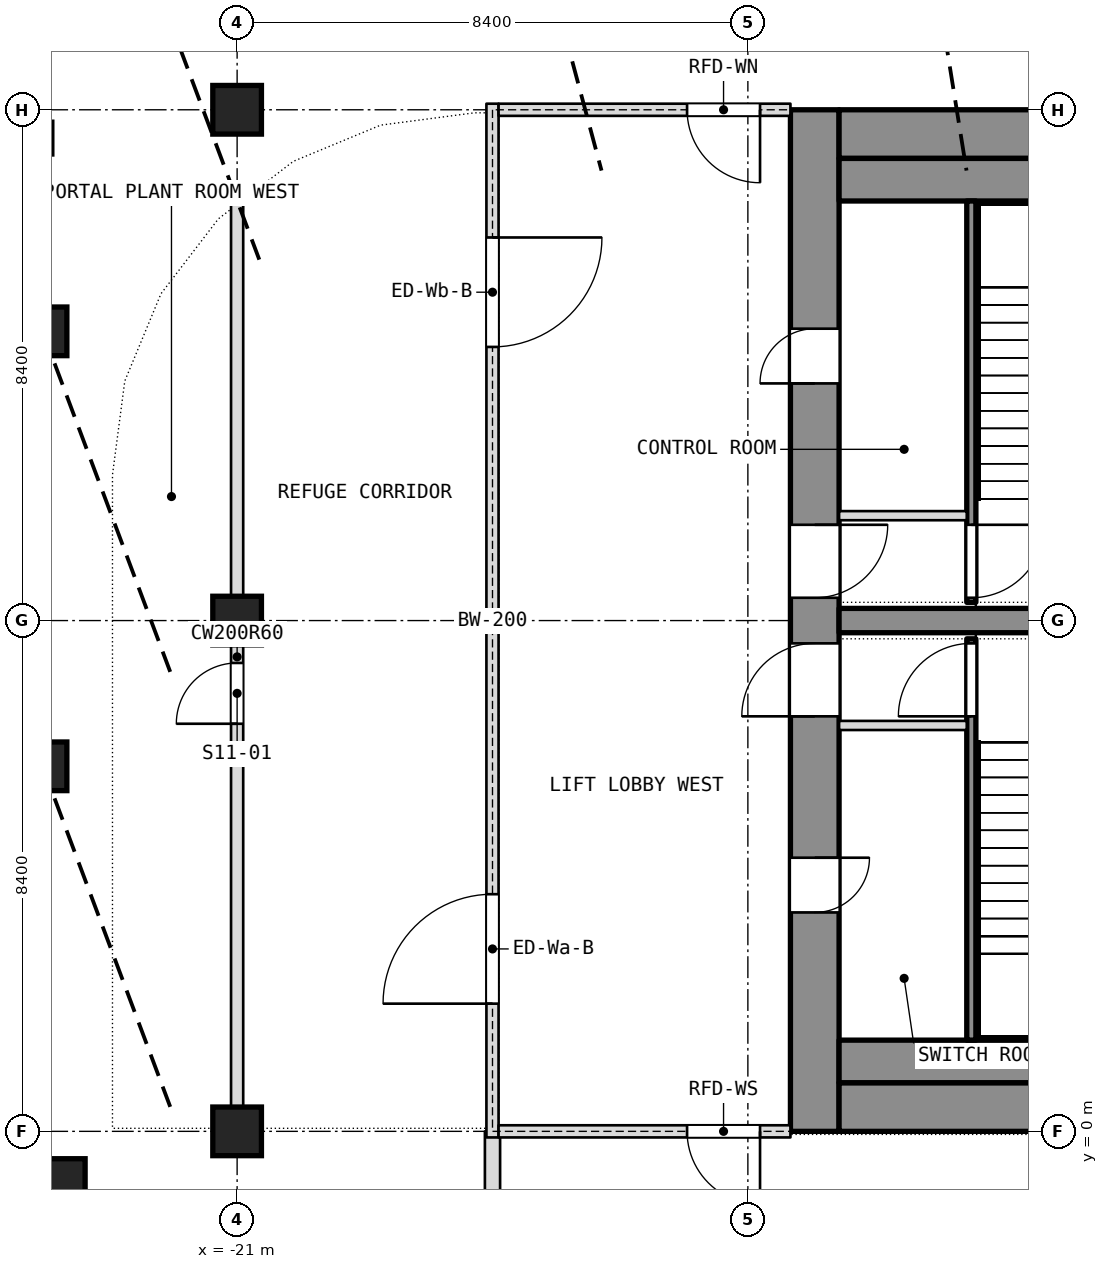
"""IFC4 building model, lengths in metres.
Left out: names, types, materials, properties, quantities, classifications, styles, units other than length and angle.
Written with IfcOpenShell. Run it as: python <this file> out.ifc"""

import sys

from ifc_helpers import new_model, si_unit, direction, frame, frame_2d, origin, origin_2d, place, context, subcontext, project, spatial, rectangle, i_section, extrude, element, fill, save


model = new_model("IFC4")
c1 = context("Model", 3, precision=1e-05, world=origin(), true_north=direction((0.0, 1.0)))
c2 = subcontext(c1, "Body", "Model", "MODEL_VIEW")
j1 = project(units=[si_unit("LENGTHUNIT", "METRE"), si_unit("PLANEANGLEUNIT", "RADIAN")], contexts=[c1])
p1 = place(None, origin())
s1 = spatial("IfcSite", under=j1, at=p1, CompositionType="ELEMENT")
p2 = place(p1, origin())
s2 = spatial("IfcBuilding", under=s1, at=p2, CompositionType="ELEMENT")
p3 = place(p2, frame((0.0, 0.0, 252.5)))
s3 = spatial("IfcBuildingStorey", under=s2, at=p3, CompositionType="ELEMENT", Elevation=252.5)
p4 = place(p3, frame((-11.5, 0.0, 0.0), z_axis=(0.0, 0.0, 1.0), x_axis=(0.0, 1.0, 0.0)))
e1 = element("IfcWall", 1, at=p4, inside=s3, PredefinedType="SHEAR", context=c2, shape_type="SweptSolid", body=[
    extrude(rectangle(XDim=16.8, YDim=0.8, at=frame_2d((8.4, 0.0))), origin(), (0.0, 0.0, 1.0), 14.4),
])
p5 = place(p4, frame((3.6, 0.0, 0.0)))
e2 = element("IfcOpeningElement", 2, at=p5, cuts=e1, PredefinedType="OPENING", context=c2, shape_type="SweptSolid", body=[
    extrude(rectangle(XDim=0.9, YDim=2.1, at=frame_2d((0.45, 1.05))), frame((0.0, 0.4, 0.0), z_axis=(0.0, -1.0, 0.0), x_axis=(1.0, 0.0, 0.0)), (0.0, 0.0, 1.0), 0.8),
])
p6 = place(p4, frame((6.825, 0.0, 0.0)))
e3 = element("IfcOpeningElement", 3, at=p6, cuts=e1, PredefinedType="OPENING", context=c2, shape_type="SweptSolid", body=[
    extrude(rectangle(XDim=1.2, YDim=2.1, at=frame_2d((0.6, 1.05))), frame((0.0, 0.4, 0.0), z_axis=(0.0, -1.0, 0.0), x_axis=(1.0, 0.0, 0.0)), (0.0, 0.0, 1.0), 0.8),
])
p7 = place(p4, frame((12.3, 0.0, 0.0)))
e4 = element("IfcOpeningElement", 4, at=p7, cuts=e1, PredefinedType="OPENING", context=c2, shape_type="SweptSolid", body=[
    extrude(rectangle(XDim=0.9, YDim=2.1, at=frame_2d((0.45, 1.05))), frame((0.0, 0.4, 0.0), z_axis=(0.0, -1.0, 0.0), x_axis=(1.0, 0.0, 0.0)), (0.0, 0.0, 1.0), 0.8),
])
p8 = place(p4, frame((8.775, 0.0, 0.0)))
e5 = element("IfcOpeningElement", 5, at=p8, cuts=e1, PredefinedType="OPENING", context=c2, shape_type="SweptSolid", body=[
    extrude(rectangle(XDim=1.2, YDim=2.1, at=frame_2d((0.6, 1.05))), frame((0.0, 0.4, 0.0), z_axis=(0.0, -1.0, 0.0), x_axis=(1.0, 0.0, 0.0)), (0.0, 0.0, 1.0), 0.8),
])
p9 = place(p3, frame((-11.1, 0.4, 0.0), z_axis=(0.0, 0.0, 1.0), x_axis=(1.0, 0.0, 0.0)))
e6 = element("IfcWall", 6, at=p9, inside=s3, PredefinedType="SHEAR", context=c2, shape_type="SweptSolid", body=[
    extrude(rectangle(XDim=22.2, YDim=0.8, at=frame_2d((11.1, 0.0))), origin(), (0.0, 0.0, 1.0), 14.4),
])
p10 = place(p9, frame((10.85, 0.0, 0.0)))
e7 = element("IfcOpeningElement", 7, at=p10, cuts=e6, PredefinedType="OPENING", context=c2, shape_type="SweptSolid", body=[
    extrude(rectangle(XDim=1.4, YDim=2.1, at=frame_2d((0.7, 1.05))), frame((0.0, 0.4, 0.0), z_axis=(0.0, -1.0, 0.0), x_axis=(1.0, 0.0, 0.0)), (0.0, 0.0, 1.0), 0.8),
])
p11 = place(p3, frame((-11.1, 16.4, 0.0), z_axis=(0.0, 0.0, 1.0), x_axis=(1.0, 0.0, 0.0)))
e8 = element("IfcWall", 8, at=p11, inside=s3, PredefinedType="SHEAR", context=c2, shape_type="SweptSolid", body=[
    extrude(rectangle(XDim=22.2, YDim=0.8, at=frame_2d((11.1, 0.0))), origin(), (0.0, 0.0, 1.0), 14.4),
])
p12 = place(p11, frame((10.4, 0.0, 0.0)))
e9 = element("IfcOpeningElement", 9, at=p12, cuts=e8, PredefinedType="OPENING", context=c2, shape_type="SweptSolid", body=[
    extrude(rectangle(XDim=1.4, YDim=2.1, at=frame_2d((0.7, 1.05))), frame((0.0, 0.4, 0.0), z_axis=(0.0, -1.0, 0.0), x_axis=(1.0, 0.0, 0.0)), (0.0, 0.0, 1.0), 0.8),
])
p13 = place(p3, frame((-11.1, 8.4, 0.0), z_axis=(0.0, 0.0, 1.0), x_axis=(1.0, 0.0, 0.0)))
e10 = element("IfcWall", 10, at=p13, inside=s3, PredefinedType="SHEAR", context=c2, shape_type="SweptSolid", body=[
    extrude(rectangle(XDim=6.7, YDim=0.4, at=frame_2d((3.35, 0.0))), origin(), (0.0, 0.0, 1.0), 14.4),
])
for number, where, z_axis, x_axis in (
    (11, (-21.0, 0.0, 0.0), (0.0, 0.0, 1.0), (1.0, 0.0, 0.0)),
    (12, (-21.0, 8.4, 0.0), (0.0, 0.0, 1.0), (1.0, 0.0, 0.0)),
    (13, (-21.0, 16.8, 0.0), (0.0, 0.0, 1.0), (1.0, 0.0, 0.0)),
):
    element("IfcColumn", number, at=place(p3, frame(where, z_axis=z_axis, x_axis=x_axis)), inside=s3, PredefinedType="COLUMN", context=c2, shape_type="SweptSolid", body=[
        extrude(rectangle(XDim=0.8, YDim=0.8, at=origin_2d()), origin(), (0.0, 0.0, 1.0), 14.14),
    ])
for number, where, z_axis, x_axis in (
    (14, (-24.2, -1.15, 0.0), (0.0, 0.0, 1.0), (1.0, 0.0, 0.0)),
    (15, (-24.2, 6.003, 0.0), (0.0, 0.0, 1.0), (1.0, 0.0, 0.0)),
    (16, (-24.2, 13.156, 0.0), (0.0, 0.0, 1.0), (1.0, 0.0, 0.0)),
):
    element("IfcColumn", number, at=place(p3, frame(where, z_axis=z_axis, x_axis=x_axis)), inside=s3, PredefinedType="COLUMN", context=c2, shape_type="SweptSolid", body=[
        extrude(i_section(OverallWidth=0.306, OverallDepth=0.524, WebThickness=0.024, FlangeThickness=0.04, FilletRadius=0.027, at=origin_2d()), origin(), (0.0, 0.0, 1.0), 13.74),
    ])
p14 = place(p3, frame((-24.2, 16.334, -0.3), z_axis=(0.0, 0.0, 1.0), x_axis=(1.0, 0.0, 0.0)))
e17 = element("IfcColumn", 17, at=p14, inside=s3, PredefinedType="COLUMN", context=c2, shape_type="SweptSolid", body=[
    extrude(i_section(OverallWidth=0.306, OverallDepth=0.524, WebThickness=0.024, FlangeThickness=0.04, FilletRadius=0.027, at=origin_2d()), origin(), (0.0, 0.0, 1.0), 14.04),
])
p15 = place(p3, frame((-21.0, 0.0, 0.0), z_axis=(0.0, 0.0, 1.0), x_axis=(0.0, 1.0, 0.0)))
e18 = element("IfcWall", 18, at=p15, inside=s3, PredefinedType="PARTITIONING", context=c2, shape_type="SweptSolid", body=[
    extrude(rectangle(XDim=15.606, YDim=0.2, at=frame_2d((7.803, 0.0))), origin(), (0.0, 0.0, 1.0), 13.74),
])
p16 = place(p15, frame((6.703, 0.0, 0.0)))
e19 = element("IfcOpeningElement", 19, at=p16, cuts=e18, PredefinedType="OPENING", context=c2, shape_type="SweptSolid", body=[
    extrude(rectangle(XDim=1.0, YDim=2.1, at=frame_2d((0.5, 1.05))), frame((0.0, 0.1, 0.0), z_axis=(0.0, -1.0, 0.0), x_axis=(1.0, 0.0, 0.0)), (0.0, 0.0, 1.0), 0.2),
])
p17 = place(p3, frame((-16.8, -14.0, 0.0), z_axis=(0.0, 0.0, 1.0), x_axis=(0.0, 1.0, 0.0)))
e20 = element("IfcWall", 20, at=p17, inside=s3, PredefinedType="SOLIDWALL", context=c2, shape_type="SweptSolid", body=[
    extrude(rectangle(XDim=14.0, YDim=0.25, at=frame_2d((7.0, 0.0))), origin(), (0.0, 0.0, 1.0), 14.14),
])
p18 = place(p17, frame((1.467, 0.0, 1.0)))
e21 = element("IfcOpeningElement", 21, at=p18, cuts=e20, PredefinedType="OPENING", context=c2, shape_type="SweptSolid", body=[
    extrude(rectangle(XDim=4.8, YDim=3.0, at=frame_2d((2.4, 1.5))), frame((0.0, 0.125, 0.0), z_axis=(0.0, -1.0, 0.0), x_axis=(1.0, 0.0, 0.0)), (0.0, 0.0, 1.0), 0.25),
])
p19 = place(p17, frame((7.733, 0.0, 1.0)))
e22 = element("IfcOpeningElement", 22, at=p19, cuts=e20, PredefinedType="OPENING", context=c2, shape_type="SweptSolid", body=[
    extrude(rectangle(XDim=4.8, YDim=3.0, at=frame_2d((2.4, 1.5))), frame((0.0, 0.125, 0.0), z_axis=(0.0, -1.0, 0.0), x_axis=(1.0, 0.0, 0.0)), (0.0, 0.0, 1.0), 0.25),
])
p20 = place(p3, frame((-11.1, 1.15, 0.0), z_axis=(0.0, 0.0, 1.0), x_axis=(1.0, 0.0, 0.0)))
e23 = element("IfcWall", 23, at=p20, inside=s3, PredefinedType="PARTITIONING", context=c2, shape_type="SweptSolid", body=[
    extrude(rectangle(XDim=10.85, YDim=0.7, at=frame_2d((5.425, 0.0))), origin(), (0.0, 0.0, 1.0), 14.14),
])
p21 = place(p3, frame((-11.1, 15.65, 0.0), z_axis=(0.0, 0.0, 1.0), x_axis=(1.0, 0.0, 0.0)))
e24 = element("IfcWall", 24, at=p21, inside=s3, PredefinedType="PARTITIONING", context=c2, shape_type="SweptSolid", body=[
    extrude(rectangle(XDim=10.2, YDim=0.7, at=frame_2d((5.1, 0.0))), origin(), (0.0, 0.0, 1.0), 14.14),
])
p22 = place(p3, frame((-8.925, 1.5, 0.0), z_axis=(0.0, 0.0, 1.0), x_axis=(0.0, 1.0, 0.0)))
e25 = element("IfcWall", 25, at=p22, inside=s3, PredefinedType="SHEAR", context=c2, shape_type="SweptSolid", body=[
    extrude(rectangle(XDim=6.6, YDim=0.15, at=frame_2d((3.3, 0.0))), origin(), (0.0, 0.0, 1.0), 14.14),
])
p23 = place(p22, frame((5.325, 0.0, 0.0)))
e26 = element("IfcOpeningElement", 26, at=p23, cuts=e25, PredefinedType="OPENING", context=c2, shape_type="SweptSolid", body=[
    extrude(rectangle(XDim=1.2, YDim=2.1, at=frame_2d((0.6, 1.05))), frame((0.0, 0.075, 0.0), z_axis=(0.0, -1.0, 0.0), x_axis=(1.0, 0.0, 0.0)), (0.0, 0.0, 1.0), 0.15),
])
p24 = place(p3, frame((-11.1, 6.675, 0.0), z_axis=(0.0, 0.0, 1.0), x_axis=(1.0, 0.0, 0.0)))
e27 = element("IfcWall", 27, at=p24, inside=s3, PredefinedType="PARTITIONING", context=c2, shape_type="SweptSolid", body=[
    extrude(rectangle(XDim=2.1, YDim=0.15, at=frame_2d((1.05, 0.0))), origin(), (0.0, 0.0, 1.0), 14.14),
])
p25 = place(p3, frame((-8.925, 8.7, 0.0), z_axis=(0.0, 0.0, 1.0), x_axis=(0.0, 1.0, 0.0)))
e28 = element("IfcWall", 28, at=p25, inside=s3, PredefinedType="SHEAR", context=c2, shape_type="SweptSolid", body=[
    extrude(rectangle(XDim=6.6, YDim=0.15, at=frame_2d((3.3, 0.0))), origin(), (0.0, 0.0, 1.0), 14.14),
])
p26 = place(p25, frame((0.075, 0.0, 0.0)))
e29 = element("IfcOpeningElement", 29, at=p26, cuts=e28, PredefinedType="OPENING", context=c2, shape_type="SweptSolid", body=[
    extrude(rectangle(XDim=1.2, YDim=2.1, at=frame_2d((0.6, 1.05))), frame((0.0, 0.075, 0.0), z_axis=(0.0, -1.0, 0.0), x_axis=(1.0, 0.0, 0.0)), (0.0, 0.0, 1.0), 0.15),
])
p27 = place(p3, frame((-11.1, 10.125, 0.0), z_axis=(0.0, 0.0, 1.0), x_axis=(1.0, 0.0, 0.0)))
e30 = element("IfcWall", 30, at=p27, inside=s3, PredefinedType="PARTITIONING", context=c2, shape_type="SweptSolid", body=[
    extrude(rectangle(XDim=2.1, YDim=0.15, at=frame_2d((1.05, 0.0))), origin(), (0.0, 0.0, 1.0), 14.14),
])
p28 = place(p3, frame((-16.8, -0.1, 0.0), z_axis=(0.0, 0.0, 1.0), x_axis=(0.0, 1.0, 0.0)))
e31 = element("IfcWall", 31, at=p28, inside=s3, PredefinedType="PARTITIONING", context=c2, shape_type="SweptSolid", body=[
    extrude(rectangle(XDim=17.0, YDim=0.2, at=frame_2d((8.5, 0.0))), origin(), (0.0, 0.0, 1.0), 13.74),
])
p29 = place(p28, frame((2.2, 0.0, 0.0)))
e32 = element("IfcOpeningElement", 32, at=p29, cuts=e31, PredefinedType="OPENING", context=c2, shape_type="SweptSolid", body=[
    extrude(rectangle(XDim=1.8, YDim=2.1, at=frame_2d((0.9, 1.05))), frame((0.0, 0.1, 0.0), z_axis=(0.0, -1.0, 0.0), x_axis=(1.0, 0.0, 0.0)), (0.0, 0.0, 1.0), 0.2),
])
p30 = place(p28, frame((13.0, 0.0, 0.0)))
e33 = element("IfcOpeningElement", 33, at=p30, cuts=e31, PredefinedType="OPENING", context=c2, shape_type="SweptSolid", body=[
    extrude(rectangle(XDim=1.8, YDim=2.1, at=frame_2d((0.9, 1.05))), frame((0.0, 0.1, 0.0), z_axis=(0.0, -1.0, 0.0), x_axis=(1.0, 0.0, 0.0)), (0.0, 0.0, 1.0), 0.2),
])
p31 = place(p3, frame((-16.7, 0.0, 0.0), z_axis=(0.0, 0.0, 1.0), x_axis=(1.0, 0.0, 0.0)))
e34 = element("IfcWall", 34, at=p31, inside=s3, PredefinedType="PARTITIONING", context=c2, shape_type="SweptSolid", body=[
    extrude(rectangle(XDim=4.8, YDim=0.2, at=frame_2d((2.4, 0.0))), origin(), (0.0, 0.0, 1.0), 13.8),
])
p32 = place(p31, frame((3.1, 0.0, 0.0)))
e35 = element("IfcOpeningElement", 35, at=p32, cuts=e34, PredefinedType="OPENING", context=c2, shape_type="SweptSolid", body=[
    extrude(rectangle(XDim=1.2, YDim=2.1, at=frame_2d((0.6, 1.05))), frame((0.0, 0.1, 0.0), z_axis=(0.0, -1.0, 0.0), x_axis=(1.0, 0.0, 0.0)), (0.0, 0.0, 1.0), 0.2),
])
p33 = place(p3, frame((-16.7, 16.8, 0.0), z_axis=(0.0, 0.0, 1.0), x_axis=(1.0, 0.0, 0.0)))
e36 = element("IfcWall", 36, at=p33, inside=s3, PredefinedType="PARTITIONING", context=c2, shape_type="SweptSolid", body=[
    extrude(rectangle(XDim=4.8, YDim=0.2, at=frame_2d((2.4, 0.0))), origin(), (0.0, 0.0, 1.0), 14.14),
])
p34 = place(p33, frame((3.1, 0.0, 0.0)))
e37 = element("IfcOpeningElement", 37, at=p34, cuts=e36, PredefinedType="OPENING", context=c2, shape_type="SweptSolid", body=[
    extrude(rectangle(XDim=1.2, YDim=2.1, at=frame_2d((0.6, 1.05))), frame((0.0, 0.1, 0.0), z_axis=(0.0, -1.0, 0.0), x_axis=(1.0, 0.0, 0.0)), (0.0, 0.0, 1.0), 0.2),
])
p35 = place(p16, origin())
e38 = element("IfcDoor", 38, at=p35, inside=s3, OperationType="SINGLE_SWING_LEFT", PredefinedType="DOOR", context=c2, shape_type="SweptSolid", body=[
    extrude(rectangle(XDim=1.0, YDim=2.1, at=frame_2d((0.5, 1.05))), frame((0.0, 0.025, 0.0), z_axis=(0.0, -1.0, 0.0), x_axis=(1.0, 0.0, 0.0)), (0.0, 0.0, 1.0), 0.05),
])
fill(e19, e38)
p36 = place(p5, origin())
e39 = element("IfcDoor", 39, at=p36, inside=s3, OperationType="SINGLE_SWING_LEFT", PredefinedType="DOOR", context=c2, shape_type="SweptSolid", body=[
    extrude(rectangle(XDim=0.9, YDim=2.1, at=frame_2d((0.45, 1.05))), frame((0.0, 0.025, 0.0), z_axis=(0.0, -1.0, 0.0), x_axis=(1.0, 0.0, 0.0)), (0.0, 0.0, 1.0), 0.05),
])
fill(e2, e39)
p37 = place(p6, origin())
e40 = element("IfcDoor", 40, at=p37, inside=s3, OperationType="SINGLE_SWING_LEFT", PredefinedType="DOOR", context=c2, shape_type="SweptSolid", body=[
    extrude(rectangle(XDim=1.2, YDim=2.1, at=frame_2d((0.6, 1.05))), frame((0.0, 0.025, 0.0), z_axis=(0.0, -1.0, 0.0), x_axis=(1.0, 0.0, 0.0)), (0.0, 0.0, 1.0), 0.05),
])
fill(e3, e40)
p38 = place(p23, origin())
e41 = element("IfcDoor", 41, at=p38, inside=s3, OperationType="SINGLE_SWING_LEFT", PredefinedType="DOOR", context=c2, shape_type="SweptSolid", body=[
    extrude(rectangle(XDim=1.2, YDim=2.1, at=frame_2d((0.6, 1.05))), frame((0.0, 0.025, 0.0), z_axis=(0.0, -1.0, 0.0), x_axis=(1.0, 0.0, 0.0)), (0.0, 0.0, 1.0), 0.05),
])
fill(e26, e41)
p39 = place(p7, origin())
e42 = element("IfcDoor", 42, at=p39, inside=s3, OperationType="SINGLE_SWING_LEFT", PredefinedType="DOOR", context=c2, shape_type="SweptSolid", body=[
    extrude(rectangle(XDim=0.9, YDim=2.1, at=frame_2d((0.45, 1.05))), frame((0.0, 0.025, 0.0), z_axis=(0.0, -1.0, 0.0), x_axis=(1.0, 0.0, 0.0)), (0.0, 0.0, 1.0), 0.05),
])
fill(e4, e42)
p40 = place(p8, origin())
e43 = element("IfcDoor", 43, at=p40, inside=s3, OperationType="SINGLE_SWING_LEFT", PredefinedType="DOOR", context=c2, shape_type="SweptSolid", body=[
    extrude(rectangle(XDim=1.2, YDim=2.1, at=frame_2d((0.6, 1.05))), frame((0.0, 0.025, 0.0), z_axis=(0.0, -1.0, 0.0), x_axis=(1.0, 0.0, 0.0)), (0.0, 0.0, 1.0), 0.05),
])
fill(e5, e43)
p41 = place(p26, origin())
e44 = element("IfcDoor", 44, at=p41, inside=s3, OperationType="SINGLE_SWING_LEFT", PredefinedType="DOOR", context=c2, shape_type="SweptSolid", body=[
    extrude(rectangle(XDim=1.2, YDim=2.1, at=frame_2d((0.6, 1.05))), frame((0.0, 0.025, 0.0), z_axis=(0.0, -1.0, 0.0), x_axis=(1.0, 0.0, 0.0)), (0.0, 0.0, 1.0), 0.05),
])
fill(e29, e44)
p42 = place(p29, origin())
e45 = element("IfcDoor", 45, at=p42, inside=s3, OperationType="DOUBLE_DOOR_SINGLE_SWING", PredefinedType="DOOR", context=c2, shape_type="SweptSolid", body=[
    extrude(rectangle(XDim=1.8, YDim=2.1, at=frame_2d((0.9, 1.05))), frame((0.0, 0.025, 0.0), z_axis=(0.0, -1.0, 0.0), x_axis=(1.0, 0.0, 0.0)), (0.0, 0.0, 1.0), 0.05),
])
fill(e32, e45)
p43 = place(p30, origin())
e46 = element("IfcDoor", 46, at=p43, inside=s3, OperationType="DOUBLE_DOOR_SINGLE_SWING", PredefinedType="DOOR", context=c2, shape_type="SweptSolid", body=[
    extrude(rectangle(XDim=1.8, YDim=2.1, at=frame_2d((0.9, 1.05))), frame((0.0, 0.025, 0.0), z_axis=(0.0, -1.0, 0.0), x_axis=(1.0, 0.0, 0.0)), (0.0, 0.0, 1.0), 0.05),
])
fill(e33, e46)
p44 = place(p32, origin())
e47 = element("IfcDoor", 47, at=p44, inside=s3, OperationType="SINGLE_SWING_LEFT", PredefinedType="DOOR", context=c2, shape_type="SweptSolid", body=[
    extrude(rectangle(XDim=1.2, YDim=2.1, at=frame_2d((0.6, 1.05))), frame((0.0, 0.025, 0.0), z_axis=(0.0, -1.0, 0.0), x_axis=(1.0, 0.0, 0.0)), (0.0, 0.0, 1.0), 0.05),
])
fill(e35, e47)
p45 = place(p34, origin())
e48 = element("IfcDoor", 48, at=p45, inside=s3, OperationType="SINGLE_SWING_LEFT", PredefinedType="DOOR", context=c2, shape_type="SweptSolid", body=[
    extrude(rectangle(XDim=1.2, YDim=2.1, at=frame_2d((0.6, 1.05))), frame((0.0, 0.025, 0.0), z_axis=(0.0, -1.0, 0.0), x_axis=(1.0, 0.0, 0.0)), (0.0, 0.0, 1.0), 0.05),
])
fill(e37, e48)
save(model, sys.argv[1])
